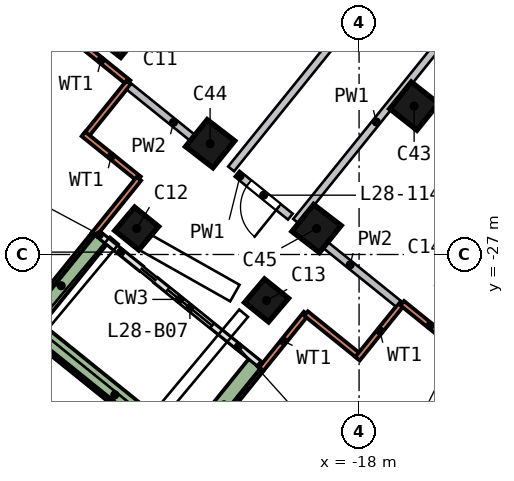
"""IFC4 building model, lengths in metres.
Left out: names, types, materials, properties, quantities, classifications, styles, units other than length and angle.
Written with IfcOpenShell. Run it as: python <this file> out.ifc"""

import sys

from ifc_helpers import new_model, si_unit, direction, frame, frame_2d, origin, origin_2d, place, context, subcontext, project, spatial, rectangle, extrude, element, fill, save


model = new_model("IFC4")
c1 = context("Model", 3, precision=1e-05, world=origin(), true_north=direction((0.0, 1.0)))
c2 = subcontext(c1, "Body", "Model", "MODEL_VIEW")
j1 = project(units=[si_unit("LENGTHUNIT", "METRE"), si_unit("PLANEANGLEUNIT", "RADIAN")], contexts=[c1])
p1 = place(None, origin())
s1 = spatial("IfcSite", under=j1, at=p1, CompositionType="ELEMENT")
p2 = place(p1, origin())
s2 = spatial("IfcBuilding", under=s1, at=p2, CompositionType="ELEMENT")
p3 = place(p2, frame((0.0, 0.0, 118.5)))
s3 = spatial("IfcBuildingStorey", under=s2, at=p3, CompositionType="ELEMENT", Elevation=118.5)
p4 = place(p3, frame((-24.573, -21.251, 0.0), z_axis=(0.191074754, 0.001278092, 0.981574656), x_axis=(-0.609056927, -0.784060002, 0.119580821)))
e1 = element("IfcColumn", 1, at=p4, inside=s3, PredefinedType="COLUMN", context=c2, shape_type="SweptSolid", body=[
    extrude(rectangle(XDim=0.8, YDim=0.8, at=origin_2d()), origin(), (0.0, 0.0, 1.0), 3.056),
])
p5 = place(p3, frame((-24.114, -26.322, 0.0), z_axis=(0.213923041, 0.003656804, 0.976843672), x_axis=(0.753680857, -0.636792219, -0.162667867)))
e2 = element("IfcColumn", 2, at=p5, inside=s3, PredefinedType="COLUMN", context=c2, shape_type="SweptSolid", body=[
    extrude(rectangle(XDim=0.8, YDim=0.8, at=origin_2d()), origin(), (0.0, 0.0, 1.0), 3.071),
])
p6 = place(p3, frame((-20.709, -28.232, 0.0), z_axis=(0.222202549, 0.019594441, 0.974803614), x_axis=(0.752603043, -0.639062376, -0.158707089)))
e3 = element("IfcColumn", 3, at=p6, inside=s3, PredefinedType="COLUMN", context=c2, shape_type="SweptSolid", body=[
    extrude(rectangle(XDim=0.8, YDim=0.8, at=origin_2d()), origin(), (0.0, 0.0, 1.0), 3.078),
])
p7 = place(p3, frame((-15.636, -27.788, 0.0), z_axis=(0.219926001, 0.043223826, 0.974558492), x_axis=(0.598816168, 0.782669413, -0.169846359)))
e4 = element("IfcColumn", 4, at=p7, inside=s3, PredefinedType="COLUMN", context=c2, shape_type="SweptSolid", body=[
    extrude(rectangle(XDim=0.8, YDim=0.8, at=origin_2d()), origin(), (0.0, 0.0, 1.0), 3.078),
])
p8 = place(p3, frame((-16.74, -23.071, 0.0), z_axis=(0.155130787, -0.019933904, 0.987692806), x_axis=(-0.617150721, -0.782650547, 0.081136357)))
e5 = element("IfcColumn", 5, at=p8, inside=s3, PredefinedType="COLUMN", context=c2, shape_type="SweptSolid", body=[
    extrude(rectangle(XDim=0.9, YDim=0.9, at=origin_2d()), origin(), (0.0, 0.0, 1.0), 3.037),
])
p9 = place(p3, frame((-22.17, -24.1, 0.0), z_axis=(0.20386154, 0.012666661, 0.978917784), x_axis=(-0.605304921, -0.784254098, 0.136203751)))
e6 = element("IfcColumn", 6, at=p9, inside=s3, PredefinedType="COLUMN", context=c2, shape_type="SweptSolid", body=[
    extrude(rectangle(XDim=0.9, YDim=0.9, at=origin_2d()), origin(), (0.0, 0.0, 1.0), 3.065),
])
p10 = place(p3, frame((-19.382, -26.348, 0.0), z_axis=(0.213701867, 0.025749128, 0.976559519), x_axis=(-0.601865135, -0.783925788, 0.152376896)))
e7 = element("IfcColumn", 7, at=p10, inside=s3, PredefinedType="COLUMN", context=c2, shape_type="SweptSolid", body=[
    extrude(rectangle(XDim=0.9, YDim=0.9, at=origin_2d()), origin(), (0.0, 0.0, 1.0), 3.072),
])
p11 = place(p3, frame((-25.524, -21.299, 0.0), z_axis=(0.0, 0.0, 1.0), x_axis=(0.778462293, -0.627691372, 0.0)))
e8 = element("IfcWall", 8, at=p11, inside=s3, PredefinedType="SOLIDWALL", context=c2, shape_type="SweptSolid", body=[
    extrude(rectangle(XDim=1.875, YDim=0.15, at=frame_2d((0.938, 0.0))), origin(), (0.0, 0.0, 1.0), 3.0),
])
p12 = place(p3, frame((-24.064, -22.476, 0.0), z_axis=(0.0, 0.0, 1.0), x_axis=(-0.627733893, -0.778428006, 0.0)))
e9 = element("IfcWall", 9, at=p12, inside=s3, PredefinedType="SOLIDWALL", context=c2, shape_type="SweptSolid", body=[
    extrude(rectangle(XDim=1.8, YDim=0.15, at=frame_2d((0.9, 0.0))), origin(), (0.0, 0.0, 1.0), 3.0),
])
for number, where, z_axis, x_axis in (
    (10, (-25.252, -23.83, 0.0), (0.0, 0.0, 1.0), (0.778, -0.628, 0.0)),
    (11, (-23.793, -25.007, 0.0), (0.0, 0.0, 1.0), (-0.628, -0.779, 0.0)),
):
    element("IfcWall", number, at=place(p3, frame(where, z_axis=z_axis, x_axis=x_axis)), inside=s3, PredefinedType="SOLIDWALL", context=c2, shape_type="SweptSolid", body=[
        extrude(rectangle(XDim=1.875, YDim=0.15, at=frame_2d((0.938, 0.0))), origin(), (0.0, 0.0, 1.0), 3.0),
    ])
p13 = place(p3, frame((-20.572, -30.013, 0.0), z_axis=(0.0, 0.0, 1.0), x_axis=(0.627691372, 0.778462293, 0.0)))
e12 = element("IfcWall", 12, at=p13, inside=s3, PredefinedType="SOLIDWALL", context=c2, shape_type="SweptSolid", body=[
    extrude(rectangle(XDim=1.875, YDim=0.15, at=frame_2d((0.938, 0.0))), origin(), (0.0, 0.0, 1.0), 3.0),
])
p14 = place(p3, frame((-19.395, -28.554, 0.0), z_axis=(0.0, 0.0, 1.0), x_axis=(0.778428006, -0.627733893, 0.0)))
e13 = element("IfcWall", 13, at=p14, inside=s3, PredefinedType="SOLIDWALL", context=c2, shape_type="SweptSolid", body=[
    extrude(rectangle(XDim=1.8, YDim=0.15, at=frame_2d((0.9, 0.0))), origin(), (0.0, 0.0, 1.0), 3.0),
])
for number, where, z_axis, x_axis in (
    (14, (-18.041, -29.742, 0.0), (0.0, 0.0, 1.0), (0.628, 0.778, 0.0)),
    (15, (-16.864, -28.282, 0.0), (0.0, 0.0, 1.0), (0.779, -0.628, 0.0)),
):
    element("IfcWall", number, at=place(p3, frame(where, z_axis=z_axis, x_axis=x_axis)), inside=s3, PredefinedType="SOLIDWALL", context=c2, shape_type="SweptSolid", body=[
        extrude(rectangle(XDim=1.875, YDim=0.15, at=frame_2d((0.938, 0.0))), origin(), (0.0, 0.0, 1.0), 3.0),
    ])
p15 = place(p3, frame((-23.346, -27.68, 0.0), z_axis=(0.0, 0.0, 1.0), x_axis=(0.778495101, -0.627650682, 0.0)))
e16 = element("IfcWall", 16, at=p15, inside=s3, PredefinedType="SOLIDWALL", context=c2, shape_type="SweptSolid", body=[
    extrude(rectangle(XDim=3.47, YDim=0.15, at=frame_2d((1.735, 0.0))), origin(), (0.0, 0.0, 1.0), 2.935),
])
p16 = place(p15, frame((0.4, 0.0, 0.0)))
e17 = element("IfcOpeningElement", 17, at=p16, cuts=e16, PredefinedType="OPENING", context=c2, shape_type="SweptSolid", body=[
    extrude(rectangle(XDim=1.5, YDim=2.4, at=frame_2d((0.75, 1.2))), frame((0.0, 0.085, 0.0), z_axis=(0.0, -1.0, 0.0), x_axis=(1.0, 0.0, 0.0)), (0.0, 0.0, 1.0), 0.17),
])
p17 = place(p3, frame((-24.802, -26.506, 0.0), z_axis=(0.0, 0.0, 1.0), x_axis=(0.778401839, -0.627766339, 0.0)))
e18 = element("IfcWall", 18, at=p17, inside=s3, PredefinedType="SOLIDWALL", context=c2, shape_type="SweptSolid", body=[
    extrude(rectangle(XDim=1.374, YDim=0.15, at=frame_2d((0.687, 0.0))), origin(), (0.0, 0.0, 1.0), 2.935),
])
p18 = place(p3, frame((-24.834, -26.578, 0.0), z_axis=(0.0, 0.0, 1.0), x_axis=(-0.627715158, -0.778443113, 0.0)))
e19 = element("IfcWall", 19, at=p18, inside=s3, PredefinedType="SOLIDWALL", context=c2, shape_type="SweptSolid", body=[
    extrude(rectangle(XDim=3.199, YDim=0.5, at=frame_2d((1.6, 0.0))), origin(), (0.0, 0.0, 1.0), 0.7),
])
p19 = place(p3, frame((-26.491, -29.03, 0.0), z_axis=(0.0, 0.0, 1.0), x_axis=(0.778481289, -0.627667813, 0.0)))
e20 = element("IfcWall", 20, at=p19, inside=s3, PredefinedType="SOLIDWALL", context=c2, shape_type="SweptSolid", body=[
    extrude(rectangle(XDim=5.3, YDim=0.5, at=frame_2d((2.65, 0.0))), origin(), (0.0, 0.0, 1.0), 0.7),
])
p20 = place(p3, frame((-22.403, -32.005, 0.0), z_axis=(0.0, 0.0, 1.0), x_axis=(0.627679958, 0.778471497, 0.0)))
e21 = element("IfcWall", 21, at=p20, inside=s3, PredefinedType="SOLIDWALL", context=c2, shape_type="SweptSolid", body=[
    extrude(rectangle(XDim=2.699, YDim=0.5, at=frame_2d((1.35, 0.0))), origin(), (0.0, 0.0, 1.0), 0.7),
])
p21 = place(p3, frame((-19.809, -26.004, 0.0), z_axis=(0.0, 0.0, 1.0), x_axis=(-0.778470697, 0.62768095, 0.0)))
e22 = element("IfcWall", 22, at=p21, inside=s3, PredefinedType="SOLIDWALL", context=c2, shape_type="SweptSolid", body=[
    extrude(rectangle(XDim=1.802, YDim=0.2, at=frame_2d((0.901, 0.0))), origin(), (0.0, 0.0, 1.0), 3.0),
])
p22 = place(p21, frame((0.4, 0.0, 0.0)))
e23 = element("IfcOpeningElement", 23, at=p22, cuts=e22, PredefinedType="OPENING", context=c2, shape_type="SweptSolid", body=[
    extrude(rectangle(XDim=1.0, YDim=2.1, at=frame_2d((0.5, 1.05))), frame((0.0, 0.11, 0.0), z_axis=(0.0, -1.0, 0.0), x_axis=(1.0, 0.0, 0.0)), (0.0, 0.0, 1.0), 0.22),
])
p23 = place(p3, frame((-21.367, -24.747, 0.0), z_axis=(0.0, 0.0, 1.0), x_axis=(0.627686308, 0.778466376, 0.0)))
e24 = element("IfcWall", 24, at=p23, inside=s3, PredefinedType="SOLIDWALL", context=c2, shape_type="SweptSolid", body=[
    extrude(rectangle(XDim=14.718, YDim=0.2, at=frame_2d((7.359, 0.0))), origin(), (0.0, 0.0, 1.0), 3.0),
])
p24 = place(p23, frame((6.85, 0.0, 0.0)))
e25 = element("IfcOpeningElement", 25, at=p24, cuts=e24, PredefinedType="OPENING", context=c2, shape_type="SweptSolid", body=[
    extrude(rectangle(XDim=1.0, YDim=2.1, at=frame_2d((0.5, 1.05))), frame((0.0, 0.11, 0.0), z_axis=(0.0, -1.0, 0.0), x_axis=(1.0, 0.0, 0.0)), (0.0, 0.0, 1.0), 0.22),
])
p25 = place(p3, frame((-10.416, -14.67, 0.0), z_axis=(0.0, 0.0, 1.0), x_axis=(-0.627686308, -0.778466376, 0.0)))
e26 = element("IfcWall", 26, at=p25, inside=s3, PredefinedType="SOLIDWALL", context=c2, shape_type="SweptSolid", body=[
    extrude(rectangle(XDim=14.718, YDim=0.2, at=frame_2d((7.359, 0.0))), origin(), (0.0, 0.0, 1.0), 3.0),
])
p26 = place(p25, frame((6.8, 0.0, 0.0)))
e27 = element("IfcOpeningElement", 27, at=p26, cuts=e26, PredefinedType="OPENING", context=c2, shape_type="SweptSolid", body=[
    extrude(rectangle(XDim=1.0, YDim=2.1, at=frame_2d((0.5, 1.05))), frame((0.0, 0.11, 0.0), z_axis=(0.0, -1.0, 0.0), x_axis=(1.0, 0.0, 0.0)), (0.0, 0.0, 1.0), 0.22),
])
p27 = place(p3, frame((-24.053, -22.582, 0.0), z_axis=(0.0, 0.0, 1.0), x_axis=(0.778483522, -0.627665043, 0.0)))
e28 = element("IfcWall", 28, at=p27, inside=s3, PredefinedType="SOLIDWALL", context=c2, shape_type="SweptSolid", body=[
    extrude(rectangle(XDim=3.003, YDim=0.2, at=frame_2d((1.501, 0.0))), origin(), (0.0, 0.0, 1.0), 3.0),
])
p28 = place(p3, frame((-19.5, -26.252, 0.0), z_axis=(0.0, 0.0, 1.0), x_axis=(0.778453274, -0.627702558, 0.0)))
e29 = element("IfcWall", 29, at=p28, inside=s3, PredefinedType="SOLIDWALL", context=c2, shape_type="SweptSolid", body=[
    extrude(rectangle(XDim=3.252, YDim=0.2, at=frame_2d((1.626, 0.0))), origin(), (0.0, 0.0, 1.0), 3.0),
])
p29 = place(p16, origin())
e30 = element("IfcDoor", 30, at=p29, inside=s3, OperationType="SLIDING_TO_RIGHT", PredefinedType="DOOR", context=c2, shape_type="SweptSolid", body=[
    extrude(rectangle(XDim=1.5, YDim=2.4, at=frame_2d((0.75, 1.2))), frame((0.0, 0.025, 0.0), z_axis=(0.0, -1.0, 0.0), x_axis=(1.0, 0.0, 0.0)), (0.0, 0.0, 1.0), 0.05),
])
fill(e17, e30)
p30 = place(p22, origin())
e31 = element("IfcDoor", 31, at=p30, inside=s3, OperationType="SINGLE_SWING_LEFT", PredefinedType="DOOR", context=c2, shape_type="SweptSolid", body=[
    extrude(rectangle(XDim=1.0, YDim=2.1, at=frame_2d((0.5, 1.05))), frame((0.0, 0.025, 0.0), z_axis=(0.0, -1.0, 0.0), x_axis=(1.0, 0.0, 0.0)), (0.0, 0.0, 1.0), 0.05),
])
fill(e23, e31)
save(model, sys.argv[1])
